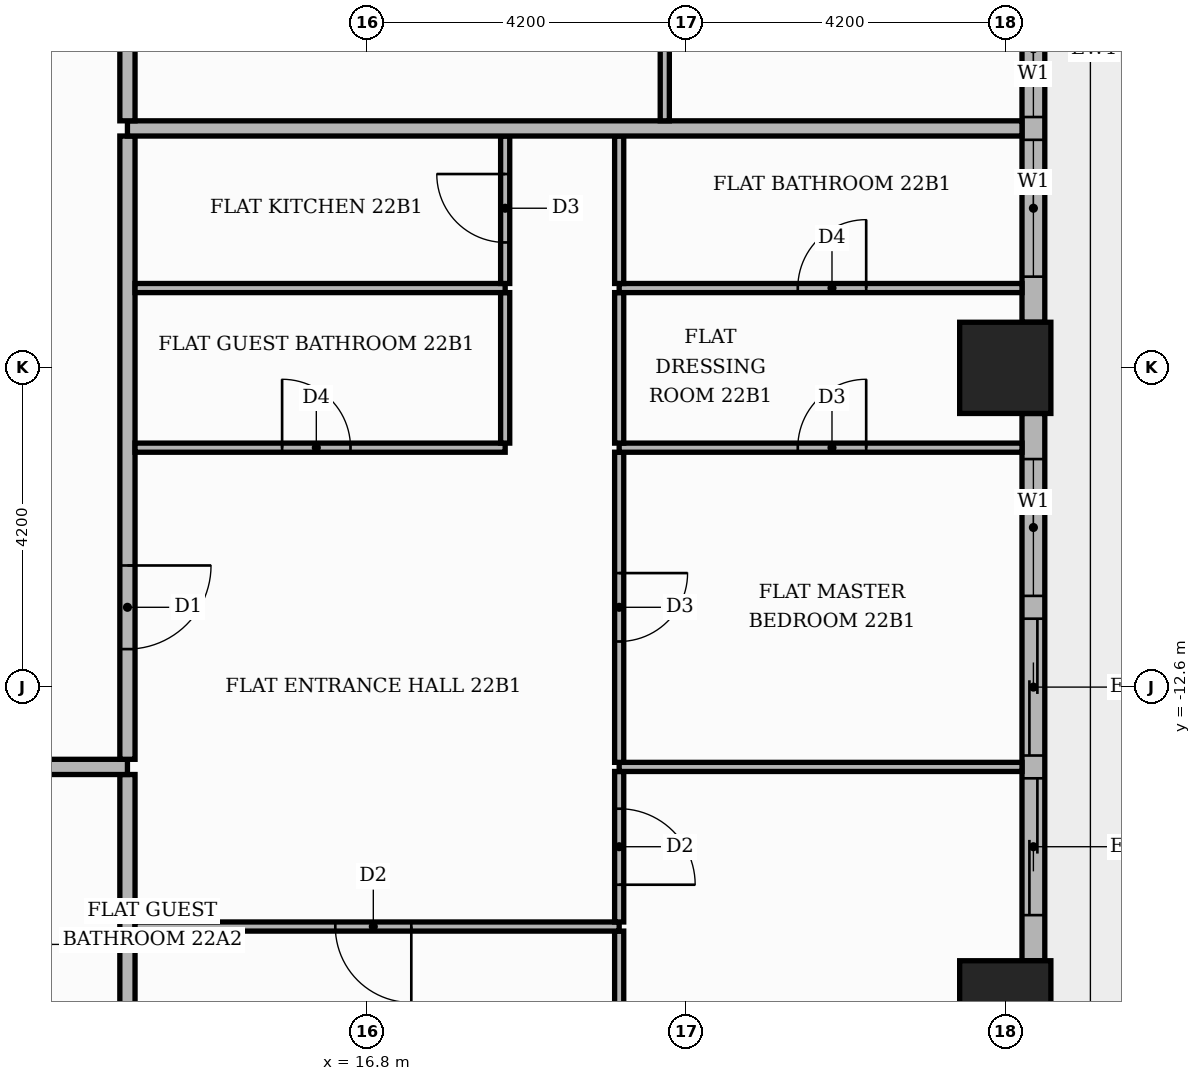
"""IFC4 building model, lengths in metres.
Left out: names, types, materials, properties, quantities, classifications, styles, units other than length and angle.
Written with IfcOpenShell. Run it as: python <this file> out.ifc"""

import sys

from ifc_helpers import new_model, si_unit, direction, frame, frame_2d, origin, origin_2d, place, context, subcontext, project, spatial, rectangle, extrude, element, fill, save


model = new_model("IFC4")
c1 = context("Model", 3, precision=1e-05, world=origin(), true_north=direction((0.0, 1.0)))
c2 = subcontext(c1, "Body", "Model", "MODEL_VIEW")
j1 = project(units=[si_unit("LENGTHUNIT", "METRE"), si_unit("PLANEANGLEUNIT", "RADIAN")], contexts=[c1])
p1 = place(None, origin())
s1 = spatial("IfcSite", under=j1, at=p1, CompositionType="ELEMENT")
p2 = place(p1, origin())
s2 = spatial("IfcBuilding", under=s1, at=p2, CompositionType="ELEMENT")
p3 = place(p2, frame((0.0, 0.0, 94.8)))
s3 = spatial("IfcBuildingStorey", under=s2, at=p3, CompositionType="ELEMENT", Elevation=94.8)
for number, where, z_axis, x_axis in (
    (1, (25.2, -8.4, 0.0), (0.0, 0.0, 1.0), (1.0, 0.0, 0.0)),
    (2, (25.2, -16.8, 0.0), (0.0, 0.0, 1.0), (1.0, 0.0, 0.0)),
):
    element("IfcColumn", number, at=place(p3, frame(where, z_axis=z_axis, x_axis=x_axis)), inside=s3, PredefinedType="COLUMN", context=c2, shape_type="SweptSolid", body=[
        extrude(rectangle(XDim=1.2, YDim=1.2, at=origin_2d()), origin(), (0.0, 0.0, 1.0), 3.9),
    ])
p4 = place(p3, frame((25.57, -16.2, 0.0), z_axis=(0.0, 0.0, 1.0), x_axis=(0.0, 1.0, 0.0)))
e3 = element("IfcWall", 3, at=p4, inside=s3, PredefinedType="STANDARD", context=c2, shape_type="SweptSolid", body=[
    extrude(rectangle(XDim=7.2, YDim=0.3, at=frame_2d((3.6, 0.0))), origin(), (0.0, 0.0, 1.0), 3.48),
])
p5 = place(p4, frame((0.6, 0.0, 0.0)))
e4 = element("IfcOpeningElement", 4, at=p5, cuts=e3, PredefinedType="OPENING", context=c2, shape_type="SweptSolid", body=[
    extrude(rectangle(XDim=1.8, YDim=2.4, at=frame_2d((0.9, 1.2))), frame((0.0, 0.16, 0.0), z_axis=(0.0, -1.0, 0.0), x_axis=(1.0, 0.0, 0.0)), (0.0, 0.0, 1.0), 0.32),
])
p6 = place(p4, frame((2.7, 0.0, 0.0)))
e5 = element("IfcOpeningElement", 5, at=p6, cuts=e3, PredefinedType="OPENING", context=c2, shape_type="SweptSolid", body=[
    extrude(rectangle(XDim=1.8, YDim=2.4, at=frame_2d((0.9, 1.2))), frame((0.0, 0.16, 0.0), z_axis=(0.0, -1.0, 0.0), x_axis=(1.0, 0.0, 0.0)), (0.0, 0.0, 1.0), 0.32),
])
p7 = place(p4, frame((4.8, 0.0, 0.9)))
e6 = element("IfcOpeningElement", 6, at=p7, cuts=e3, PredefinedType="OPENING", context=c2, shape_type="SweptSolid", body=[
    extrude(rectangle(XDim=1.8, YDim=2.1, at=frame_2d((0.9, 1.05))), frame((0.0, 0.16, 0.0), z_axis=(0.0, -1.0, 0.0), x_axis=(1.0, 0.0, 0.0)), (0.0, 0.0, 1.0), 0.32),
])
p8 = place(p3, frame((25.57, -7.8, 0.0), z_axis=(0.0, 0.0, 1.0), x_axis=(0.0, 1.0, 0.0)))
e7 = element("IfcWall", 7, at=p8, inside=s3, PredefinedType="STANDARD", context=c2, shape_type="SweptSolid", body=[
    extrude(rectangle(XDim=7.2, YDim=0.3, at=frame_2d((3.6, 0.0))), origin(), (0.0, 0.0, 1.0), 3.48),
])
p9 = place(p8, frame((0.6, 0.0, 0.9)))
e8 = element("IfcOpeningElement", 8, at=p9, cuts=e7, PredefinedType="OPENING", context=c2, shape_type="SweptSolid", body=[
    extrude(rectangle(XDim=1.8, YDim=2.1, at=frame_2d((0.9, 1.05))), frame((0.0, 0.16, 0.0), z_axis=(0.0, -1.0, 0.0), x_axis=(1.0, 0.0, 0.0)), (0.0, 0.0, 1.0), 0.32),
])
p10 = place(p8, frame((2.7, 0.0, 0.9)))
e9 = element("IfcOpeningElement", 9, at=p10, cuts=e7, PredefinedType="OPENING", context=c2, shape_type="SweptSolid", body=[
    extrude(rectangle(XDim=1.8, YDim=2.1, at=frame_2d((0.9, 1.05))), frame((0.0, 0.16, 0.0), z_axis=(0.0, -1.0, 0.0), x_axis=(1.0, 0.0, 0.0)), (0.0, 0.0, 1.0), 0.32),
])
p11 = place(p8, frame((4.8, 0.0, 0.0)))
e10 = element("IfcOpeningElement", 10, at=p11, cuts=e7, PredefinedType="OPENING", context=c2, shape_type="SweptSolid", body=[
    extrude(rectangle(XDim=1.8, YDim=2.4, at=frame_2d((0.9, 1.2))), frame((0.0, 0.16, 0.0), z_axis=(0.0, -1.0, 0.0), x_axis=(1.0, 0.0, 0.0)), (0.0, 0.0, 1.0), 0.32),
])
p12 = place(p3, frame((13.65, -25.42, 0.0), z_axis=(0.0, 0.0, 1.0), x_axis=(0.0, 1.0, 0.0)))
e11 = element("IfcWall", 11, at=p12, inside=s3, PredefinedType="PARTITIONING", context=c2, shape_type="SweptSolid", body=[
    extrude(rectangle(XDim=11.67, YDim=0.2, at=frame_2d((5.835, 0.0))), origin(), (0.0, 0.0, 1.0), 3.48),
])
p13 = place(p3, frame((20.12, -17.4, 0.0), z_axis=(0.0, 0.0, 1.0), x_axis=(0.0, 1.0, 0.0)))
e12 = element("IfcWall", 12, at=p13, inside=s3, PredefinedType="PARTITIONING", context=c2, shape_type="SweptSolid", body=[
    extrude(rectangle(XDim=1.59, YDim=0.12, at=frame_2d((0.795, 0.0))), origin(), (0.0, 0.0, 1.0), 3.48),
])
p14 = place(p3, frame((13.75, -15.75, 0.0), z_axis=(0.0, 0.0, 1.0), x_axis=(1.0, 0.0, 0.0)))
e13 = element("IfcWall", 13, at=p14, inside=s3, PredefinedType="PARTITIONING", context=c2, shape_type="SweptSolid", body=[
    extrude(rectangle(XDim=6.37, YDim=0.12, at=frame_2d((3.185, 0.0))), origin(), (0.0, 0.0, 1.0), 3.48),
])
p15 = place(p14, frame((2.635, 0.0, 0.0)))
e14 = element("IfcOpeningElement", 14, at=p15, cuts=e13, PredefinedType="OPENING", context=c2, shape_type="SweptSolid", body=[
    extrude(rectangle(XDim=1.0, YDim=2.1, at=frame_2d((0.5, 1.05))), frame((0.0, 0.07, 0.0), z_axis=(0.0, -1.0, 0.0), x_axis=(1.0, 0.0, 0.0)), (0.0, 0.0, 1.0), 0.14),
])
p16 = place(p3, frame((20.12, -15.69, 0.0), z_axis=(0.0, 0.0, 1.0), x_axis=(0.0, 1.0, 0.0)))
e15 = element("IfcWall", 15, at=p16, inside=s3, PredefinedType="PARTITIONING", context=c2, shape_type="SweptSolid", body=[
    extrude(rectangle(XDim=1.98, YDim=0.12, at=frame_2d((0.99, 0.0))), origin(), (0.0, 0.0, 1.0), 3.48),
])
p17 = place(p16, frame((0.49, 0.0, 0.0)))
e16 = element("IfcOpeningElement", 16, at=p17, cuts=e15, PredefinedType="OPENING", context=c2, shape_type="SweptSolid", body=[
    extrude(rectangle(XDim=1.0, YDim=2.1, at=frame_2d((0.5, 1.05))), frame((0.0, 0.07, 0.0), z_axis=(0.0, -1.0, 0.0), x_axis=(1.0, 0.0, 0.0)), (0.0, 0.0, 1.0), 0.14),
])
p18 = place(p3, frame((-25.42, -13.65, 0.0), z_axis=(0.0, 0.0, 1.0), x_axis=(1.0, 0.0, 0.0)))
e17 = element("IfcWall", 17, at=p18, inside=s3, PredefinedType="PARTITIONING", context=c2, shape_type="SweptSolid", body=[
    extrude(rectangle(XDim=39.07, YDim=0.2, at=frame_2d((19.535, 0.0))), origin(), (0.0, 0.0, 1.0), 3.48),
])
p19 = place(p18, frame((13.32, 0.0, 0.0)))
e18 = element("IfcOpeningElement", 18, at=p19, cuts=e17, PredefinedType="OPENING", context=c2, shape_type="SweptSolid", body=[
    extrude(rectangle(XDim=1.1, YDim=2.4, at=frame_2d((0.55, 1.2))), frame((0.0, 0.11, 0.0), z_axis=(0.0, -1.0, 0.0), x_axis=(1.0, 0.0, 0.0)), (0.0, 0.0, 1.0), 0.22),
])
p20 = place(p18, frame((23.82, 0.0, 0.0)))
e19 = element("IfcOpeningElement", 19, at=p20, cuts=e17, PredefinedType="OPENING", context=c2, shape_type="SweptSolid", body=[
    extrude(rectangle(XDim=1.1, YDim=2.4, at=frame_2d((0.55, 1.2))), frame((0.0, 0.11, 0.0), z_axis=(0.0, -1.0, 0.0), x_axis=(1.0, 0.0, 0.0)), (0.0, 0.0, 1.0), 0.22),
])
p21 = place(p3, frame((20.12, -13.65, 0.0), z_axis=(0.0, 0.0, 1.0), x_axis=(1.0, 0.0, 0.0)))
e20 = element("IfcWall", 20, at=p21, inside=s3, PredefinedType="PARTITIONING", context=c2, shape_type="SweptSolid", body=[
    extrude(rectangle(XDim=5.3, YDim=0.12, at=frame_2d((2.65, 0.0))), origin(), (0.0, 0.0, 1.0), 3.48),
])
p22 = place(p3, frame((20.12, -13.59, 0.0), z_axis=(0.0, 0.0, 1.0), x_axis=(0.0, 1.0, 0.0)))
e21 = element("IfcWall", 21, at=p22, inside=s3, PredefinedType="PARTITIONING", context=c2, shape_type="SweptSolid", body=[
    extrude(rectangle(XDim=4.08, YDim=0.12, at=frame_2d((2.04, 0.0))), origin(), (0.0, 0.0, 1.0), 3.48),
])
p23 = place(p22, frame((1.59, 0.0, 0.0)))
e22 = element("IfcOpeningElement", 22, at=p23, cuts=e21, PredefinedType="OPENING", context=c2, shape_type="SweptSolid", body=[
    extrude(rectangle(XDim=0.9, YDim=2.1, at=frame_2d((0.45, 1.05))), frame((0.0, 0.07, 0.0), z_axis=(0.0, -1.0, 0.0), x_axis=(1.0, 0.0, 0.0)), (0.0, 0.0, 1.0), 0.14),
])
p24 = place(p3, frame((13.65, -13.55, 0.0), z_axis=(0.0, 0.0, 1.0), x_axis=(0.0, 1.0, 0.0)))
e23 = element("IfcWall", 23, at=p24, inside=s3, PredefinedType="PARTITIONING", context=c2, shape_type="SweptSolid", body=[
    extrude(rectangle(XDim=8.2, YDim=0.2, at=frame_2d((4.1, 0.0))), origin(), (0.0, 0.0, 1.0), 3.48),
])
p25 = place(p24, frame((1.45, 0.0, 0.0)))
e24 = element("IfcOpeningElement", 24, at=p25, cuts=e23, PredefinedType="OPENING", context=c2, shape_type="SweptSolid", body=[
    extrude(rectangle(XDim=1.1, YDim=2.4, at=frame_2d((0.55, 1.2))), frame((0.0, 0.11, 0.0), z_axis=(0.0, -1.0, 0.0), x_axis=(1.0, 0.0, 0.0)), (0.0, 0.0, 1.0), 0.22),
])
p26 = place(p3, frame((13.75, -9.45, 0.0), z_axis=(0.0, 0.0, 1.0), x_axis=(1.0, 0.0, 0.0)))
e25 = element("IfcWall", 25, at=p26, inside=s3, PredefinedType="PARTITIONING", context=c2, shape_type="SweptSolid", body=[
    extrude(rectangle(XDim=4.87, YDim=0.12, at=frame_2d((2.435, 0.0))), origin(), (0.0, 0.0, 1.0), 3.48),
])
p27 = place(p26, frame((1.935, 0.0, 0.0)))
e26 = element("IfcOpeningElement", 26, at=p27, cuts=e25, PredefinedType="OPENING", context=c2, shape_type="SweptSolid", body=[
    extrude(rectangle(XDim=0.9, YDim=2.1, at=frame_2d((0.45, 1.05))), frame((0.0, 0.07, 0.0), z_axis=(0.0, -1.0, 0.0), x_axis=(1.0, 0.0, 0.0)), (0.0, 0.0, 1.0), 0.14),
])
p28 = place(p3, frame((20.12, -9.45, 0.0), z_axis=(0.0, 0.0, 1.0), x_axis=(1.0, 0.0, 0.0)))
e27 = element("IfcWall", 27, at=p28, inside=s3, PredefinedType="PARTITIONING", context=c2, shape_type="SweptSolid", body=[
    extrude(rectangle(XDim=5.3, YDim=0.12, at=frame_2d((2.65, 0.0))), origin(), (0.0, 0.0, 1.0), 3.48),
])
p29 = place(p28, frame((2.35, 0.0, 0.0)))
e28 = element("IfcOpeningElement", 28, at=p29, cuts=e27, PredefinedType="OPENING", context=c2, shape_type="SweptSolid", body=[
    extrude(rectangle(XDim=0.9, YDim=2.1, at=frame_2d((0.45, 1.05))), frame((0.0, 0.07, 0.0), z_axis=(0.0, -1.0, 0.0), x_axis=(1.0, 0.0, 0.0)), (0.0, 0.0, 1.0), 0.14),
])
for number, where, z_axis, x_axis in (
    (29, (18.62, -9.39, 0.0), (0.0, 0.0, 1.0), (0.0, 1.0, 0.0)),
    (30, (20.12, -9.39, 0.0), (0.0, 0.0, 1.0), (0.0, 1.0, 0.0)),
):
    element("IfcWall", number, at=place(p3, frame(where, z_axis=z_axis, x_axis=x_axis)), inside=s3, PredefinedType="PARTITIONING", context=c2, shape_type="SweptSolid", body=[
        extrude(rectangle(XDim=1.98, YDim=0.12, at=frame_2d((0.99, 0.0))), origin(), (0.0, 0.0, 1.0), 3.48),
    ])
p30 = place(p3, frame((13.75, -7.35, 0.0), z_axis=(0.0, 0.0, 1.0), x_axis=(1.0, 0.0, 0.0)))
e31 = element("IfcWall", 31, at=p30, inside=s3, PredefinedType="PARTITIONING", context=c2, shape_type="SweptSolid", body=[
    extrude(rectangle(XDim=4.87, YDim=0.12, at=frame_2d((2.435, 0.0))), origin(), (0.0, 0.0, 1.0), 3.48),
])
p31 = place(p3, frame((20.12, -7.35, 0.0), z_axis=(0.0, 0.0, 1.0), x_axis=(1.0, 0.0, 0.0)))
e32 = element("IfcWall", 32, at=p31, inside=s3, PredefinedType="PARTITIONING", context=c2, shape_type="SweptSolid", body=[
    extrude(rectangle(XDim=5.3, YDim=0.12, at=frame_2d((2.65, 0.0))), origin(), (0.0, 0.0, 1.0), 3.48),
])
p32 = place(p31, frame((2.35, 0.0, 0.0)))
e33 = element("IfcOpeningElement", 33, at=p32, cuts=e32, PredefinedType="OPENING", context=c2, shape_type="SweptSolid", body=[
    extrude(rectangle(XDim=0.9, YDim=2.1, at=frame_2d((0.45, 1.05))), frame((0.0, 0.07, 0.0), z_axis=(0.0, -1.0, 0.0), x_axis=(1.0, 0.0, 0.0)), (0.0, 0.0, 1.0), 0.14),
])
p33 = place(p3, frame((18.62, -7.29, 0.0), z_axis=(0.0, 0.0, 1.0), x_axis=(0.0, 1.0, 0.0)))
e34 = element("IfcWall", 34, at=p33, inside=s3, PredefinedType="PARTITIONING", context=c2, shape_type="SweptSolid", body=[
    extrude(rectangle(XDim=1.94, YDim=0.12, at=frame_2d((0.97, 0.0))), origin(), (0.0, 0.0, 1.0), 3.48),
])
p34 = place(p33, frame((0.54, 0.0, 0.0)))
e35 = element("IfcOpeningElement", 35, at=p34, cuts=e34, PredefinedType="OPENING", context=c2, shape_type="SweptSolid", body=[
    extrude(rectangle(XDim=0.9, YDim=2.1, at=frame_2d((0.45, 1.05))), frame((0.0, 0.07, 0.0), z_axis=(0.0, -1.0, 0.0), x_axis=(1.0, 0.0, 0.0)), (0.0, 0.0, 1.0), 0.14),
])
p35 = place(p3, frame((20.12, -7.29, 0.0), z_axis=(0.0, 0.0, 1.0), x_axis=(0.0, 1.0, 0.0)))
e36 = element("IfcWall", 36, at=p35, inside=s3, PredefinedType="PARTITIONING", context=c2, shape_type="SweptSolid", body=[
    extrude(rectangle(XDim=1.94, YDim=0.12, at=frame_2d((0.97, 0.0))), origin(), (0.0, 0.0, 1.0), 3.48),
])
p36 = place(p3, frame((13.65, -5.25, 0.0), z_axis=(0.0, 0.0, 1.0), x_axis=(1.0, 0.0, 0.0)))
e37 = element("IfcWall", 37, at=p36, inside=s3, PredefinedType="PARTITIONING", context=c2, shape_type="SweptSolid", body=[
    extrude(rectangle(XDim=11.77, YDim=0.2, at=frame_2d((5.885, 0.0))), origin(), (0.0, 0.0, 1.0), 3.48),
])
p37 = place(p3, frame((13.65, -5.15, 0.0), z_axis=(0.0, 0.0, 1.0), x_axis=(0.0, 1.0, 0.0)))
e38 = element("IfcWall", 38, at=p37, inside=s3, PredefinedType="PARTITIONING", context=c2, shape_type="SweptSolid", body=[
    extrude(rectangle(XDim=18.7, YDim=0.2, at=frame_2d((9.35, 0.0))), origin(), (0.0, 0.0, 1.0), 3.48),
])
p38 = place(p37, frame((1.45, 0.0, 0.0)))
e39 = element("IfcOpeningElement", 39, at=p38, cuts=e38, PredefinedType="OPENING", context=c2, shape_type="SweptSolid", body=[
    extrude(rectangle(XDim=1.1, YDim=2.4, at=frame_2d((0.55, 1.2))), frame((0.0, 0.11, 0.0), z_axis=(0.0, -1.0, 0.0), x_axis=(1.0, 0.0, 0.0)), (0.0, 0.0, 1.0), 0.22),
])
p39 = place(p3, frame((20.72, -5.15, 0.0), z_axis=(0.0, 0.0, 1.0), x_axis=(0.0, 1.0, 0.0)))
e40 = element("IfcWall", 40, at=p39, inside=s3, PredefinedType="PARTITIONING", context=c2, shape_type="SweptSolid", body=[
    extrude(rectangle(XDim=4.04, YDim=0.12, at=frame_2d((2.02, 0.0))), origin(), (0.0, 0.0, 1.0), 3.48),
])
p40 = place(p39, frame((1.5, 0.0, 0.0)))
e41 = element("IfcOpeningElement", 41, at=p40, cuts=e40, PredefinedType="OPENING", context=c2, shape_type="SweptSolid", body=[
    extrude(rectangle(XDim=1.0, YDim=2.1, at=frame_2d((0.5, 1.05))), frame((0.0, 0.07, 0.0), z_axis=(0.0, -1.0, 0.0), x_axis=(1.0, 0.0, 0.0)), (0.0, 0.0, 1.0), 0.14),
])
p41 = place(p5, origin())
e42 = element("IfcDoor", 42, at=p41, inside=s3, OperationType="SLIDING_TO_LEFT", PredefinedType="DOOR", context=c2, shape_type="SweptSolid", body=[
    extrude(rectangle(XDim=1.8, YDim=2.4, at=frame_2d((0.9, 1.2))), frame((0.0, 0.025, 0.0), z_axis=(0.0, -1.0, 0.0), x_axis=(1.0, 0.0, 0.0)), (0.0, 0.0, 1.0), 0.05),
])
fill(e4, e42)
p42 = place(p6, origin())
e43 = element("IfcDoor", 43, at=p42, inside=s3, OperationType="SLIDING_TO_RIGHT", PredefinedType="DOOR", context=c2, shape_type="SweptSolid", body=[
    extrude(rectangle(XDim=1.8, YDim=2.4, at=frame_2d((0.9, 1.2))), frame((0.0, 0.025, 0.0), z_axis=(0.0, -1.0, 0.0), x_axis=(1.0, 0.0, 0.0)), (0.0, 0.0, 1.0), 0.05),
])
fill(e5, e43)
p43 = place(p7, origin())
e44 = element("IfcWindow", 44, at=p43, inside=s3, PartitioningType="SINGLE_PANEL", PredefinedType="WINDOW", context=c2, shape_type="SweptSolid", body=[
    extrude(rectangle(XDim=1.8, YDim=2.1, at=frame_2d((0.9, 1.05))), frame((0.0, 0.03, 0.0), z_axis=(0.0, -1.0, 0.0), x_axis=(1.0, 0.0, 0.0)), (0.0, 0.0, 1.0), 0.06),
])
fill(e6, e44)
p44 = place(p9, origin())
e45 = element("IfcWindow", 45, at=p44, inside=s3, PartitioningType="SINGLE_PANEL", PredefinedType="WINDOW", context=c2, shape_type="SweptSolid", body=[
    extrude(rectangle(XDim=1.8, YDim=2.1, at=frame_2d((0.9, 1.05))), frame((0.0, 0.03, 0.0), z_axis=(0.0, -1.0, 0.0), x_axis=(1.0, 0.0, 0.0)), (0.0, 0.0, 1.0), 0.06),
])
fill(e8, e45)
p45 = place(p10, origin())
e46 = element("IfcWindow", 46, at=p45, inside=s3, PartitioningType="SINGLE_PANEL", PredefinedType="WINDOW", context=c2, shape_type="SweptSolid", body=[
    extrude(rectangle(XDim=1.8, YDim=2.1, at=frame_2d((0.9, 1.05))), frame((0.0, 0.03, 0.0), z_axis=(0.0, -1.0, 0.0), x_axis=(1.0, 0.0, 0.0)), (0.0, 0.0, 1.0), 0.06),
])
fill(e9, e46)
p46 = place(p25, frame((1.1, 0.0, 0.0), z_axis=(0.0, 0.0, 1.0), x_axis=(-1.0, 0.0, 0.0)))
e47 = element("IfcDoor", 47, at=p46, inside=s3, OperationType="SINGLE_SWING_RIGHT", PredefinedType="DOOR", context=c2, shape_type="SweptSolid", body=[
    extrude(rectangle(XDim=1.1, YDim=2.4, at=frame_2d((0.55, 1.2))), frame((0.0, 0.025, 0.0), z_axis=(0.0, -1.0, 0.0), x_axis=(1.0, 0.0, 0.0)), (0.0, 0.0, 1.0), 0.05),
])
fill(e24, e47)
p47 = place(p15, frame((1.0, 0.0, 0.0), z_axis=(0.0, 0.0, 1.0), x_axis=(-1.0, 0.0, 0.0)))
e48 = element("IfcDoor", 48, at=p47, inside=s3, OperationType="SINGLE_SWING_RIGHT", PredefinedType="DOOR", context=c2, shape_type="SweptSolid", body=[
    extrude(rectangle(XDim=1.0, YDim=2.1, at=frame_2d((0.5, 1.05))), frame((0.0, 0.025, 0.0), z_axis=(0.0, -1.0, 0.0), x_axis=(1.0, 0.0, 0.0)), (0.0, 0.0, 1.0), 0.05),
])
fill(e14, e48)
p48 = place(p27, origin())
e49 = element("IfcDoor", 49, at=p48, inside=s3, OperationType="SINGLE_SWING_LEFT", PredefinedType="DOOR", context=c2, shape_type="SweptSolid", body=[
    extrude(rectangle(XDim=0.9, YDim=2.1, at=frame_2d((0.45, 1.05))), frame((0.0, 0.025, 0.0), z_axis=(0.0, -1.0, 0.0), x_axis=(1.0, 0.0, 0.0)), (0.0, 0.0, 1.0), 0.05),
])
fill(e26, e49)
p49 = place(p34, origin())
e50 = element("IfcDoor", 50, at=p49, inside=s3, OperationType="SINGLE_SWING_RIGHT", PredefinedType="DOOR", context=c2, shape_type="SweptSolid", body=[
    extrude(rectangle(XDim=0.9, YDim=2.1, at=frame_2d((0.45, 1.05))), frame((0.0, 0.025, 0.0), z_axis=(0.0, -1.0, 0.0), x_axis=(1.0, 0.0, 0.0)), (0.0, 0.0, 1.0), 0.05),
])
fill(e35, e50)
p50 = place(p17, frame((1.0, 0.0, 0.0), z_axis=(0.0, 0.0, 1.0), x_axis=(-1.0, 0.0, 0.0)))
e51 = element("IfcDoor", 51, at=p50, inside=s3, OperationType="SINGLE_SWING_LEFT", PredefinedType="DOOR", context=c2, shape_type="SweptSolid", body=[
    extrude(rectangle(XDim=1.0, YDim=2.1, at=frame_2d((0.5, 1.05))), frame((0.0, 0.025, 0.0), z_axis=(0.0, -1.0, 0.0), x_axis=(1.0, 0.0, 0.0)), (0.0, 0.0, 1.0), 0.05),
])
fill(e16, e51)
p51 = place(p23, frame((0.9, 0.0, 0.0), z_axis=(0.0, 0.0, 1.0), x_axis=(-1.0, 0.0, 0.0)))
e52 = element("IfcDoor", 52, at=p51, inside=s3, OperationType="SINGLE_SWING_RIGHT", PredefinedType="DOOR", context=c2, shape_type="SweptSolid", body=[
    extrude(rectangle(XDim=0.9, YDim=2.1, at=frame_2d((0.45, 1.05))), frame((0.0, 0.025, 0.0), z_axis=(0.0, -1.0, 0.0), x_axis=(1.0, 0.0, 0.0)), (0.0, 0.0, 1.0), 0.05),
])
fill(e22, e52)
p52 = place(p29, origin())
e53 = element("IfcDoor", 53, at=p52, inside=s3, OperationType="SINGLE_SWING_RIGHT", PredefinedType="DOOR", context=c2, shape_type="SweptSolid", body=[
    extrude(rectangle(XDim=0.9, YDim=2.1, at=frame_2d((0.45, 1.05))), frame((0.0, 0.025, 0.0), z_axis=(0.0, -1.0, 0.0), x_axis=(1.0, 0.0, 0.0)), (0.0, 0.0, 1.0), 0.05),
])
fill(e28, e53)
p53 = place(p32, origin())
e54 = element("IfcDoor", 54, at=p53, inside=s3, OperationType="SINGLE_SWING_RIGHT", PredefinedType="DOOR", context=c2, shape_type="SweptSolid", body=[
    extrude(rectangle(XDim=0.9, YDim=2.1, at=frame_2d((0.45, 1.05))), frame((0.0, 0.025, 0.0), z_axis=(0.0, -1.0, 0.0), x_axis=(1.0, 0.0, 0.0)), (0.0, 0.0, 1.0), 0.05),
])
fill(e33, e54)
save(model, sys.argv[1])
